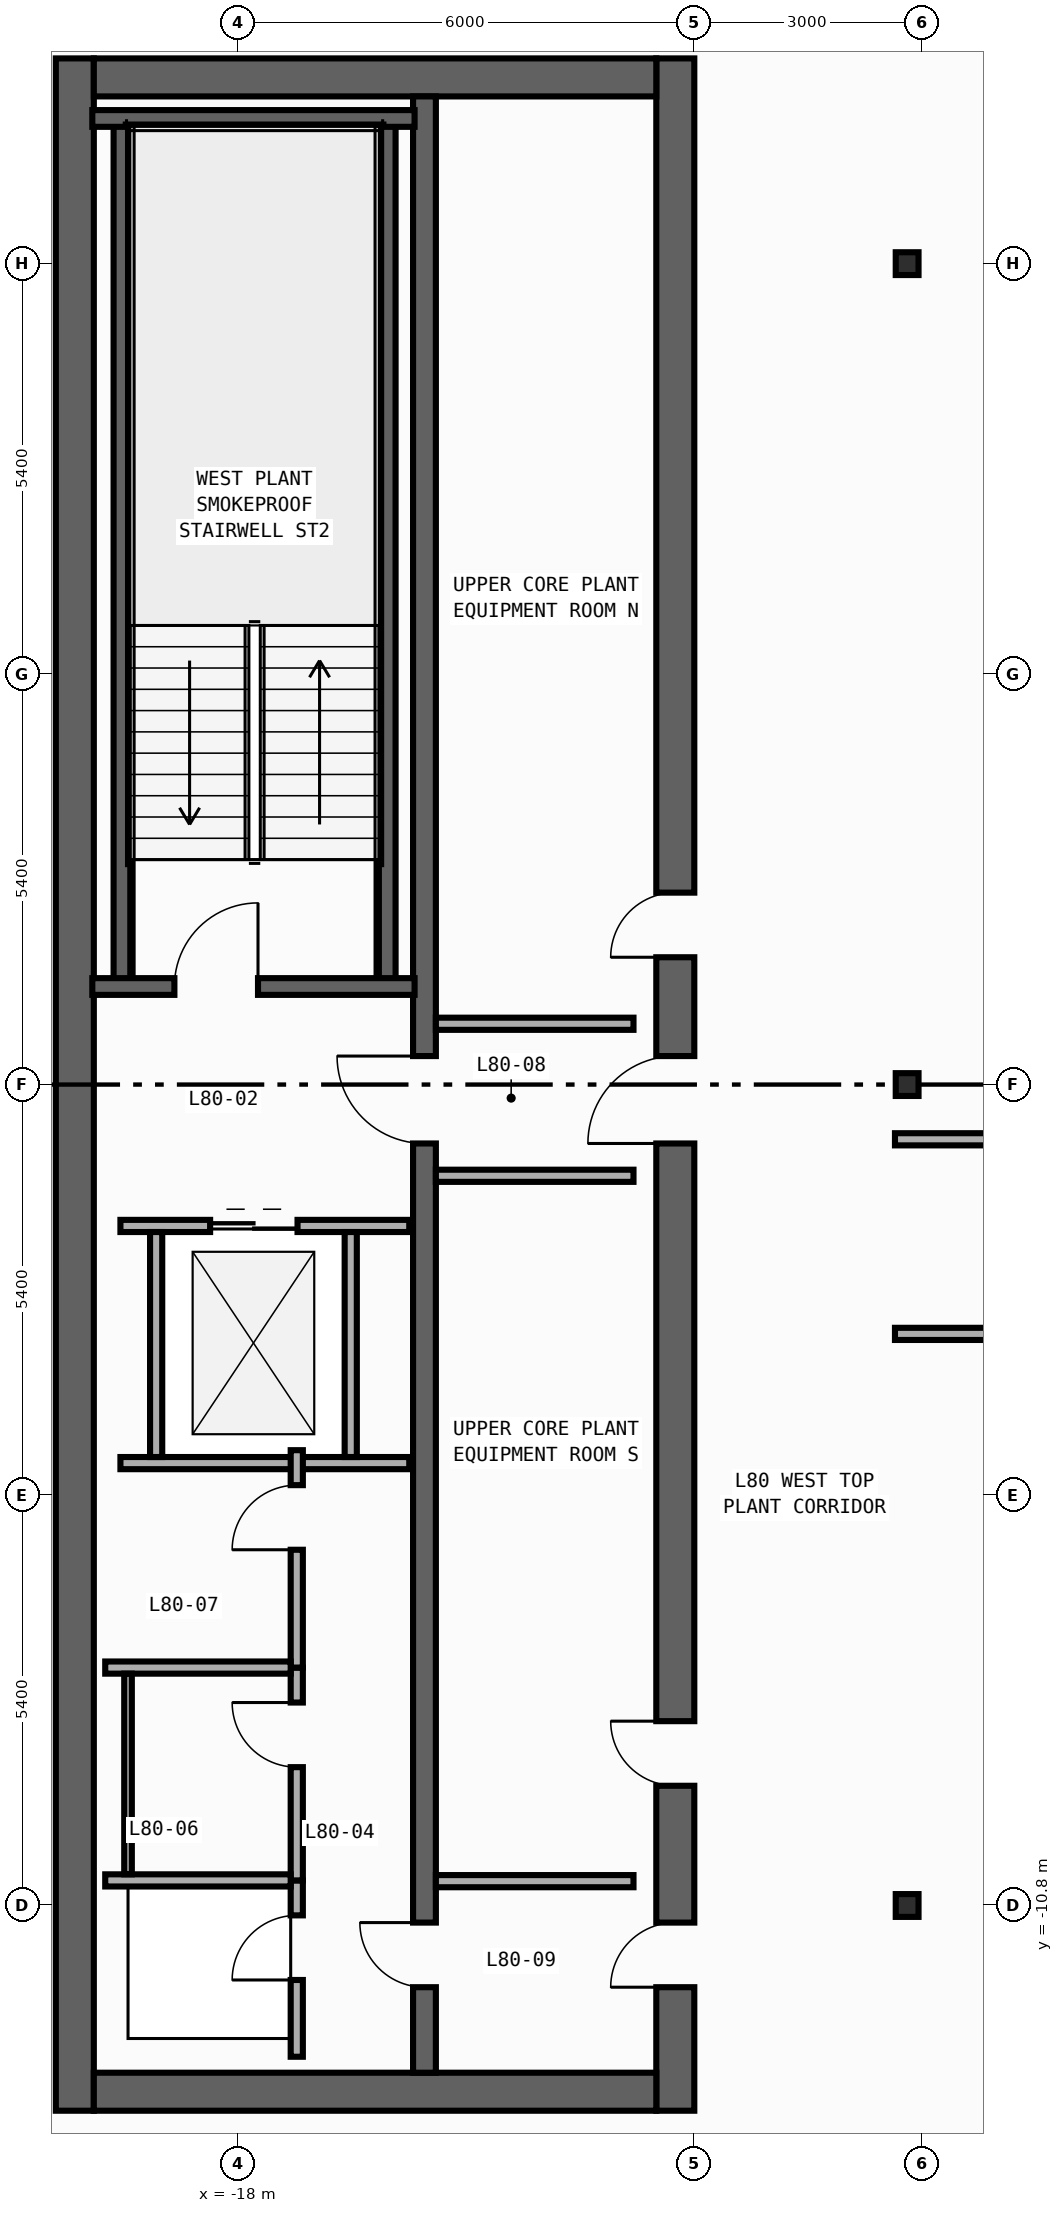
"""IFC4 building model, lengths in metres.
Left out: names, types, materials, properties, quantities, classifications, styles, units other than length and angle.
Written with IfcOpenShell. Run it as: python <this file> out.ifc"""

import sys

from ifc_helpers import new_model, si_unit, direction, frame, frame_2d, origin, origin_2d, place, context, subcontext, project, spatial, rectangle, i_section, extrude, element, fill, save


model = new_model("IFC4")
c1 = context("Model", 3, precision=1e-05, world=origin(), true_north=direction((0.0, 1.0)))
c2 = subcontext(c1, "Body", "Model", "MODEL_VIEW")
j1 = project(units=[si_unit("LENGTHUNIT", "METRE"), si_unit("PLANEANGLEUNIT", "RADIAN")], contexts=[c1])
p1 = place(None, origin())
s1 = spatial("IfcSite", under=j1, at=p1, CompositionType="ELEMENT")
p2 = place(p1, origin())
s2 = spatial("IfcBuilding", under=s1, at=p2, CompositionType="ELEMENT")
p3 = place(p2, frame((0.0, 0.0, 335.0)))
s3 = spatial("IfcBuildingStorey", under=s2, at=p3, CompositionType="ELEMENT", Elevation=335.0)
p4 = place(p3, frame((-20.15, -13.5, 0.0), z_axis=(0.0, 0.0, 1.0), x_axis=(0.0, 1.0, 0.0)))
e1 = element("IfcWall", 1, at=p4, inside=s3, PredefinedType="SHEAR", context=c2, shape_type="SweptSolid", body=[
    extrude(rectangle(XDim=27.0, YDim=0.5, at=frame_2d((13.5, 0.0))), origin(), (0.0, 0.0, 1.0), 4.22),
])
p5 = place(p3, frame((-12.25, -13.5, 0.0), z_axis=(0.0, 0.0, 1.0), x_axis=(0.0, 1.0, 0.0)))
e2 = element("IfcWall", 2, at=p5, inside=s3, PredefinedType="SHEAR", context=c2, shape_type="SweptSolid", body=[
    extrude(rectangle(XDim=27.0, YDim=0.5, at=frame_2d((13.5, 0.0))), origin(), (0.0, 0.0, 1.0), 4.22),
])
p6 = place(p5, frame((15.175, 0.0, 0.0)))
e3 = element("IfcOpeningElement", 3, at=p6, cuts=e2, PredefinedType="OPENING", context=c2, shape_type="SweptSolid", body=[
    extrude(rectangle(XDim=0.85, YDim=2.1, at=frame_2d((0.425, 1.05))), frame((0.0, 0.26, 0.0), z_axis=(0.0, -1.0, 0.0), x_axis=(1.0, 0.0, 0.0)), (0.0, 0.0, 1.0), 0.52),
])
p7 = place(p5, frame((4.275, 0.0, 0.0)))
e4 = element("IfcOpeningElement", 4, at=p7, cuts=e2, PredefinedType="OPENING", context=c2, shape_type="SweptSolid", body=[
    extrude(rectangle(XDim=0.85, YDim=2.1, at=frame_2d((0.425, 1.05))), frame((0.0, 0.26, 0.0), z_axis=(0.0, -1.0, 0.0), x_axis=(1.0, 0.0, 0.0)), (0.0, 0.0, 1.0), 0.52),
])
p8 = place(p5, frame((12.725, 0.0, 0.0)))
e5 = element("IfcOpeningElement", 5, at=p8, cuts=e2, PredefinedType="OPENING", context=c2, shape_type="SweptSolid", body=[
    extrude(rectangle(XDim=1.15, YDim=2.2, at=frame_2d((0.575, 1.1))), frame((0.0, 0.26, 0.0), z_axis=(0.0, -1.0, 0.0), x_axis=(1.0, 0.0, 0.0)), (0.0, 0.0, 1.0), 0.52),
])
p9 = place(p5, frame((1.625, 0.0, 0.0)))
e6 = element("IfcOpeningElement", 6, at=p9, cuts=e2, PredefinedType="OPENING", context=c2, shape_type="SweptSolid", body=[
    extrude(rectangle(XDim=0.85, YDim=2.1, at=frame_2d((0.425, 1.05))), frame((0.0, 0.26, 0.0), z_axis=(0.0, -1.0, 0.0), x_axis=(1.0, 0.0, 0.0)), (0.0, 0.0, 1.0), 0.52),
])
for number, where, z_axis, x_axis in (
    (7, (-19.9, -13.25, 0.0), (0.0, 0.0, 1.0), (1.0, 0.0, 0.0)),
    (8, (-19.9, 13.25, 0.0), (0.0, 0.0, 1.0), (1.0, 0.0, 0.0)),
):
    element("IfcWall", number, at=place(p3, frame(where, z_axis=z_axis, x_axis=x_axis)), inside=s3, PredefinedType="SHEAR", context=c2, shape_type="SweptSolid", body=[
        extrude(rectangle(XDim=7.4, YDim=0.5, at=frame_2d((3.7, 0.0))), origin(), (0.0, 0.0, 1.0), 4.22),
    ])
p10 = place(p3, frame((-15.55, -13.0, 0.0), z_axis=(0.0, 0.0, 1.0), x_axis=(0.0, 1.0, 0.0)))
e9 = element("IfcWall", 9, at=p10, inside=s3, PredefinedType="SHEAR", context=c2, shape_type="SweptSolid", body=[
    extrude(rectangle(XDim=26.0, YDim=0.3, at=frame_2d((13.0, 0.0))), origin(), (0.0, 0.0, 1.0), 4.22),
])
p11 = place(p10, frame((12.225, 0.0, 0.0)))
e10 = element("IfcOpeningElement", 10, at=p11, cuts=e9, PredefinedType="OPENING", context=c2, shape_type="SweptSolid", body=[
    extrude(rectangle(XDim=1.15, YDim=2.2, at=frame_2d((0.575, 1.1))), frame((0.0, 0.16, 0.0), z_axis=(0.0, -1.0, 0.0), x_axis=(1.0, 0.0, 0.0)), (0.0, 0.0, 1.0), 0.32),
])
p12 = place(p10, frame((1.125, 0.0, 0.0)))
e11 = element("IfcOpeningElement", 11, at=p12, cuts=e9, PredefinedType="OPENING", context=c2, shape_type="SweptSolid", body=[
    extrude(rectangle(XDim=0.85, YDim=2.1, at=frame_2d((0.425, 1.05))), frame((0.0, 0.16, 0.0), z_axis=(0.0, -1.0, 0.0), x_axis=(1.0, 0.0, 0.0)), (0.0, 0.0, 1.0), 0.32),
])
for number, where, z_axis, x_axis in (
    (12, (-16.04, 1.29, 0.0), (0.0, 0.0, 1.0), (0.0, 1.0, 0.0)),
    (13, (-19.53, 1.29, 0.0), (0.0, 0.0, 1.0), (0.0, 1.0, 0.0)),
):
    element("IfcWall", number, at=place(p3, frame(where, z_axis=z_axis, x_axis=x_axis)), inside=s3, PredefinedType="SHEAR", context=c2, shape_type="SweptSolid", body=[
        extrude(rectangle(XDim=11.42, YDim=0.22, at=frame_2d((5.71, 0.0))), origin(), (0.0, 0.0, 1.0), 4.22),
    ])
p13 = place(p3, frame((-19.92, 12.71, 0.0), z_axis=(0.0, 0.0, 1.0), x_axis=(1.0, 0.0, 0.0)))
e14 = element("IfcWall", 14, at=p13, inside=s3, PredefinedType="SHEAR", context=c2, shape_type="SweptSolid", body=[
    extrude(rectangle(XDim=4.24, YDim=0.22, at=frame_2d((2.12, 0.0))), origin(), (0.0, 0.0, 1.0), 4.22),
])
p14 = place(p3, frame((-19.92, 1.29, 0.0), z_axis=(0.0, 0.0, 1.0), x_axis=(1.0, 0.0, 0.0)))
e15 = element("IfcWall", 15, at=p14, inside=s3, PredefinedType="SHEAR", context=c2, shape_type="SweptSolid", body=[
    extrude(rectangle(XDim=4.24, YDim=0.22, at=frame_2d((2.12, 0.0))), origin(), (0.0, 0.0, 1.0), 4.22),
])
p15 = place(p14, frame((1.08, 0.0, 0.0)))
e16 = element("IfcOpeningElement", 16, at=p15, cuts=e15, PredefinedType="OPENING", context=c2, shape_type="SweptSolid", body=[
    extrude(rectangle(XDim=1.1, YDim=2.2, at=frame_2d((0.55, 1.1))), frame((0.0, 0.12, 0.0), z_axis=(0.0, -1.0, 0.0), x_axis=(1.0, 0.0, 0.0)), (0.0, 0.0, 1.0), 0.24),
])
for number, where, z_axis, x_axis in (
    (17, (-9.2, -10.8, 0.0), (0.0, 0.0, 1.0), (1.0, 0.0, 0.0)),
    (18, (-9.2, 0.0, 0.0), (0.0, 0.0, 1.0), (1.0, 0.0, 0.0)),
    (19, (-9.2, 10.8, 0.0), (0.0, 0.0, 1.0), (1.0, 0.0, 0.0)),
):
    element("IfcColumn", number, at=place(p3, frame(where, z_axis=z_axis, x_axis=x_axis)), inside=s3, PredefinedType="COLUMN", context=c2, shape_type="SweptSolid", body=[
        extrude(i_section(OverallWidth=0.3, OverallDepth=0.3, WebThickness=0.01, FlangeThickness=0.015, FilletRadius=0.018, at=origin_2d()), origin(), (0.0, 0.0, 1.0), 4.5),
    ])
p16 = place(p3, frame((-19.55, -1.86, 0.0), z_axis=(0.0, 0.0, 1.0), x_axis=(1.0, 0.0, 0.0)))
e20 = element("IfcWall", 20, at=p16, inside=s3, PredefinedType="STANDARD", context=c2, shape_type="SweptSolid", body=[
    extrude(rectangle(XDim=3.8, YDim=0.16, at=frame_2d((1.9, 0.0))), origin(), (0.0, 0.0, 1.0), 4.22),
])
p17 = place(p16, frame((1.18, 0.0, 0.0)))
e21 = element("IfcOpeningElement", 21, at=p17, cuts=e20, PredefinedType="OPENING", context=c2, shape_type="SweptSolid", body=[
    extrude(rectangle(XDim=1.15, YDim=2.2, at=frame_2d((0.575, 1.1))), frame((0.0, 0.09, 0.0), z_axis=(0.0, -1.0, 0.0), x_axis=(1.0, 0.0, 0.0)), (0.0, 0.0, 1.0), 0.18),
])
p18 = place(p3, frame((-19.55, -4.98, 0.0), z_axis=(0.0, 0.0, 1.0), x_axis=(1.0, 0.0, 0.0)))
e22 = element("IfcWall", 22, at=p18, inside=s3, PredefinedType="STANDARD", context=c2, shape_type="SweptSolid", body=[
    extrude(rectangle(XDim=3.8, YDim=0.16, at=frame_2d((1.9, 0.0))), origin(), (0.0, 0.0, 1.0), 4.22),
])
for number, where, z_axis, x_axis in (
    (23, (-19.08, -4.9, 0.0), (0.0, 0.0, 1.0), (0.0, 1.0, 0.0)),
    (24, (-16.52, -4.9, 0.0), (0.0, 0.0, 1.0), (0.0, 1.0, 0.0)),
):
    element("IfcWall", number, at=place(p3, frame(where, z_axis=z_axis, x_axis=x_axis)), inside=s3, PredefinedType="STANDARD", context=c2, shape_type="SweptSolid", body=[
        extrude(rectangle(XDim=2.96, YDim=0.16, at=frame_2d((1.48, 0.0))), origin(), (0.0, 0.0, 1.0), 4.22),
    ])
for number, where, z_axis, x_axis in (
    (25, (-15.4, 0.8, 0.0), (0.0, 0.0, 1.0), (1.0, 0.0, 0.0)),
    (26, (-15.4, -1.2, 0.0), (0.0, 0.0, 1.0), (1.0, 0.0, 0.0)),
    (27, (-15.4, -10.48, 0.0), (0.0, 0.0, 1.0), (1.0, 0.0, 0.0)),
):
    element("IfcWall", number, at=place(p3, frame(where, z_axis=z_axis, x_axis=x_axis)), inside=s3, PredefinedType="STANDARD", context=c2, shape_type="SweptSolid", body=[
        extrude(rectangle(XDim=2.6, YDim=0.16, at=frame_2d((1.3, 0.0))), origin(), (0.0, 0.0, 1.0), 4.22),
    ])
p19 = place(p3, frame((-17.23, -12.79, 0.0), z_axis=(0.0, 0.0, 1.0), x_axis=(0.0, 1.0, 0.0)))
e28 = element("IfcWall", 28, at=p19, inside=s3, PredefinedType="PARTITIONING", context=c2, shape_type="SweptSolid", body=[
    extrude(rectangle(XDim=2.32, YDim=0.16, at=frame_2d((1.16, 0.0))), origin(), (0.0, 0.0, 1.0), 4.22),
])
p20 = place(p19, frame((1.01, 0.0, 0.0)))
e29 = element("IfcOpeningElement", 29, at=p20, cuts=e28, PredefinedType="OPENING", context=c2, shape_type="SweptSolid", body=[
    extrude(rectangle(XDim=0.85, YDim=2.1, at=frame_2d((0.425, 1.05))), frame((0.0, 0.09, 0.0), z_axis=(0.0, -1.0, 0.0), x_axis=(1.0, 0.0, 0.0)), (0.0, 0.0, 1.0), 0.18),
])
p21 = place(p3, frame((-17.23, -10.47, 0.0), z_axis=(0.0, 0.0, 1.0), x_axis=(0.0, 1.0, 0.0)))
e30 = element("IfcWall", 30, at=p21, inside=s3, PredefinedType="PARTITIONING", context=c2, shape_type="SweptSolid", body=[
    extrude(rectangle(XDim=2.8, YDim=0.16, at=frame_2d((1.4, 0.0))), origin(), (0.0, 0.0, 1.0), 4.22),
])
p22 = place(p21, frame((1.49, 0.0, 0.0)))
e31 = element("IfcOpeningElement", 31, at=p22, cuts=e30, PredefinedType="OPENING", context=c2, shape_type="SweptSolid", body=[
    extrude(rectangle(XDim=0.85, YDim=2.1, at=frame_2d((0.425, 1.05))), frame((0.0, 0.09, 0.0), z_axis=(0.0, -1.0, 0.0), x_axis=(1.0, 0.0, 0.0)), (0.0, 0.0, 1.0), 0.18),
])
p23 = place(p3, frame((-17.23, -7.67, 0.0), z_axis=(0.0, 0.0, 1.0), x_axis=(0.0, 1.0, 0.0)))
e32 = element("IfcWall", 32, at=p23, inside=s3, PredefinedType="PARTITIONING", context=c2, shape_type="SweptSolid", body=[
    extrude(rectangle(XDim=2.86, YDim=0.16, at=frame_2d((1.43, 0.0))), origin(), (0.0, 0.0, 1.0), 4.22),
])
p24 = place(p23, frame((1.55, 0.0, 0.0)))
e33 = element("IfcOpeningElement", 33, at=p24, cuts=e32, PredefinedType="OPENING", context=c2, shape_type="SweptSolid", body=[
    extrude(rectangle(XDim=0.85, YDim=2.1, at=frame_2d((0.425, 1.05))), frame((0.0, 0.09, 0.0), z_axis=(0.0, -1.0, 0.0), x_axis=(1.0, 0.0, 0.0)), (0.0, 0.0, 1.0), 0.18),
])
for number, where, z_axis, x_axis in (
    (34, (-19.75, -10.47, 0.0), (0.0, 0.0, 1.0), (1.0, 0.0, 0.0)),
    (35, (-19.75, -7.67, 0.0), (0.0, 0.0, 1.0), (1.0, 0.0, 0.0)),
):
    element("IfcWall", number, at=place(p3, frame(where, z_axis=z_axis, x_axis=x_axis)), inside=s3, PredefinedType="PARTITIONING", context=c2, shape_type="SweptSolid", body=[
        extrude(rectangle(XDim=2.44, YDim=0.16, at=frame_2d((1.22, 0.0))), origin(), (0.0, 0.0, 1.0), 4.22),
    ])
p25 = place(p3, frame((-9.36, -0.72, 0.0), z_axis=(0.0, 0.0, 1.0), x_axis=(1.0, 0.0, 0.0)))
e36 = element("IfcWall", 36, at=p25, inside=s3, PredefinedType="PARTITIONING", context=c2, shape_type="SweptSolid", body=[
    extrude(rectangle(XDim=11.94, YDim=0.16, at=frame_2d((5.97, 0.0))), origin(), (0.0, 0.0, 1.0), 4.22),
])
p26 = place(p25, frame((8.961, 0.0, 0.0)))
e37 = element("IfcOpeningElement", 37, at=p26, cuts=e36, PredefinedType="OPENING", context=c2, shape_type="SweptSolid", body=[
    extrude(rectangle(XDim=0.9, YDim=2.15, at=frame_2d((0.45, 1.075))), frame((0.0, 0.09, 0.0), z_axis=(0.0, -1.0, 0.0), x_axis=(1.0, 0.0, 0.0)), (0.0, 0.0, 1.0), 0.18),
])
p27 = place(p3, frame((-9.36, -3.28, 0.0), z_axis=(0.0, 0.0, 1.0), x_axis=(1.0, 0.0, 0.0)))
e38 = element("IfcWall", 38, at=p27, inside=s3, PredefinedType="PARTITIONING", context=c2, shape_type="SweptSolid", body=[
    extrude(rectangle(XDim=11.24, YDim=0.16, at=frame_2d((5.62, 0.0))), origin(), (0.0, 0.0, 1.0), 4.22),
])
p28 = place(p27, frame((8.878, 0.0, 0.0)))
e39 = element("IfcOpeningElement", 39, at=p28, cuts=e38, PredefinedType="OPENING", context=c2, shape_type="SweptSolid", body=[
    extrude(rectangle(XDim=0.9, YDim=2.15, at=frame_2d((0.45, 1.075))), frame((0.0, 0.09, 0.0), z_axis=(0.0, -1.0, 0.0), x_axis=(1.0, 0.0, 0.0)), (0.0, 0.0, 1.0), 0.18),
])
p29 = place(p3, frame((-19.45, -10.39, 0.0), z_axis=(0.0, 0.0, 1.0), x_axis=(0.0, 1.0, 0.0)))
e40 = element("IfcWall", 40, at=p29, inside=s3, PredefinedType="PARTITIONING", context=c2, shape_type="SweptSolid", body=[
    extrude(rectangle(XDim=2.64, YDim=0.1, at=frame_2d((1.32, 0.0))), origin(), (0.0, 0.0, 1.0), 4.22),
])
p30 = place(p15, origin())
e41 = element("IfcDoor", 41, at=p30, inside=s3, OperationType="SINGLE_SWING_RIGHT", PredefinedType="DOOR", context=c2, shape_type="SweptSolid", body=[
    extrude(rectangle(XDim=1.1, YDim=2.2, at=frame_2d((0.55, 1.1))), frame((0.0, 0.025, 0.0), z_axis=(0.0, -1.0, 0.0), x_axis=(1.0, 0.0, 0.0)), (0.0, 0.0, 1.0), 0.05),
])
fill(e16, e41)
p31 = place(p6, origin())
e42 = element("IfcDoor", 42, at=p31, inside=s3, OperationType="SINGLE_SWING_LEFT", PredefinedType="DOOR", context=c2, shape_type="SweptSolid", body=[
    extrude(rectangle(XDim=0.85, YDim=2.1, at=frame_2d((0.425, 1.05))), frame((0.0, 0.025, 0.0), z_axis=(0.0, -1.0, 0.0), x_axis=(1.0, 0.0, 0.0)), (0.0, 0.0, 1.0), 0.05),
])
fill(e3, e42)
p32 = place(p7, origin())
e43 = element("IfcDoor", 43, at=p32, inside=s3, OperationType="SINGLE_SWING_RIGHT", PredefinedType="DOOR", context=c2, shape_type="SweptSolid", body=[
    extrude(rectangle(XDim=0.85, YDim=2.1, at=frame_2d((0.425, 1.05))), frame((0.0, 0.025, 0.0), z_axis=(0.0, -1.0, 0.0), x_axis=(1.0, 0.0, 0.0)), (0.0, 0.0, 1.0), 0.05),
])
fill(e4, e43)
p33 = place(p8, origin())
e44 = element("IfcDoor", 44, at=p33, inside=s3, OperationType="SINGLE_SWING_LEFT", PredefinedType="DOOR", context=c2, shape_type="SweptSolid", body=[
    extrude(rectangle(XDim=1.15, YDim=2.2, at=frame_2d((0.575, 1.1))), frame((0.0, 0.025, 0.0), z_axis=(0.0, -1.0, 0.0), x_axis=(1.0, 0.0, 0.0)), (0.0, 0.0, 1.0), 0.05),
])
fill(e5, e44)
p34 = place(p11, origin())
e45 = element("IfcDoor", 45, at=p34, inside=s3, OperationType="SINGLE_SWING_RIGHT", PredefinedType="DOOR", context=c2, shape_type="SweptSolid", body=[
    extrude(rectangle(XDim=1.15, YDim=2.2, at=frame_2d((0.575, 1.1))), frame((0.0, 0.025, 0.0), z_axis=(0.0, -1.0, 0.0), x_axis=(1.0, 0.0, 0.0)), (0.0, 0.0, 1.0), 0.05),
])
fill(e10, e45)
p35 = place(p9, origin())
e46 = element("IfcDoor", 46, at=p35, inside=s3, OperationType="SINGLE_SWING_LEFT", PredefinedType="DOOR", context=c2, shape_type="SweptSolid", body=[
    extrude(rectangle(XDim=0.85, YDim=2.1, at=frame_2d((0.425, 1.05))), frame((0.0, 0.025, 0.0), z_axis=(0.0, -1.0, 0.0), x_axis=(1.0, 0.0, 0.0)), (0.0, 0.0, 1.0), 0.05),
])
fill(e6, e46)
p36 = place(p12, origin())
e47 = element("IfcDoor", 47, at=p36, inside=s3, OperationType="SINGLE_SWING_RIGHT", PredefinedType="DOOR", context=c2, shape_type="SweptSolid", body=[
    extrude(rectangle(XDim=0.85, YDim=2.1, at=frame_2d((0.425, 1.05))), frame((0.0, 0.025, 0.0), z_axis=(0.0, -1.0, 0.0), x_axis=(1.0, 0.0, 0.0)), (0.0, 0.0, 1.0), 0.05),
])
fill(e11, e47)
p37 = place(p17, origin())
e48 = element("IfcDoor", 48, at=p37, inside=s3, OperationType="DOUBLE_DOOR_SLIDING", PredefinedType="DOOR", context=c2, shape_type="SweptSolid", body=[
    extrude(rectangle(XDim=1.15, YDim=2.2, at=frame_2d((0.575, 1.1))), frame((0.0, 0.025, 0.0), z_axis=(0.0, -1.0, 0.0), x_axis=(1.0, 0.0, 0.0)), (0.0, 0.0, 1.0), 0.05),
])
fill(e21, e48)
p38 = place(p20, origin())
e49 = element("IfcDoor", 49, at=p38, inside=s3, OperationType="SINGLE_SWING_LEFT", PredefinedType="DOOR", context=c2, shape_type="SweptSolid", body=[
    extrude(rectangle(XDim=0.85, YDim=2.1, at=frame_2d((0.425, 1.05))), frame((0.0, 0.025, 0.0), z_axis=(0.0, -1.0, 0.0), x_axis=(1.0, 0.0, 0.0)), (0.0, 0.0, 1.0), 0.05),
])
fill(e29, e49)
p39 = place(p22, origin())
e50 = element("IfcDoor", 50, at=p39, inside=s3, OperationType="SINGLE_SWING_RIGHT", PredefinedType="DOOR", context=c2, shape_type="SweptSolid", body=[
    extrude(rectangle(XDim=0.85, YDim=2.1, at=frame_2d((0.425, 1.05))), frame((0.0, 0.025, 0.0), z_axis=(0.0, -1.0, 0.0), x_axis=(1.0, 0.0, 0.0)), (0.0, 0.0, 1.0), 0.05),
])
fill(e31, e50)
p40 = place(p24, origin())
e51 = element("IfcDoor", 51, at=p40, inside=s3, OperationType="SINGLE_SWING_LEFT", PredefinedType="DOOR", context=c2, shape_type="SweptSolid", body=[
    extrude(rectangle(XDim=0.85, YDim=2.1, at=frame_2d((0.425, 1.05))), frame((0.0, 0.025, 0.0), z_axis=(0.0, -1.0, 0.0), x_axis=(1.0, 0.0, 0.0)), (0.0, 0.0, 1.0), 0.05),
])
fill(e33, e51)
save(model, sys.argv[1])
